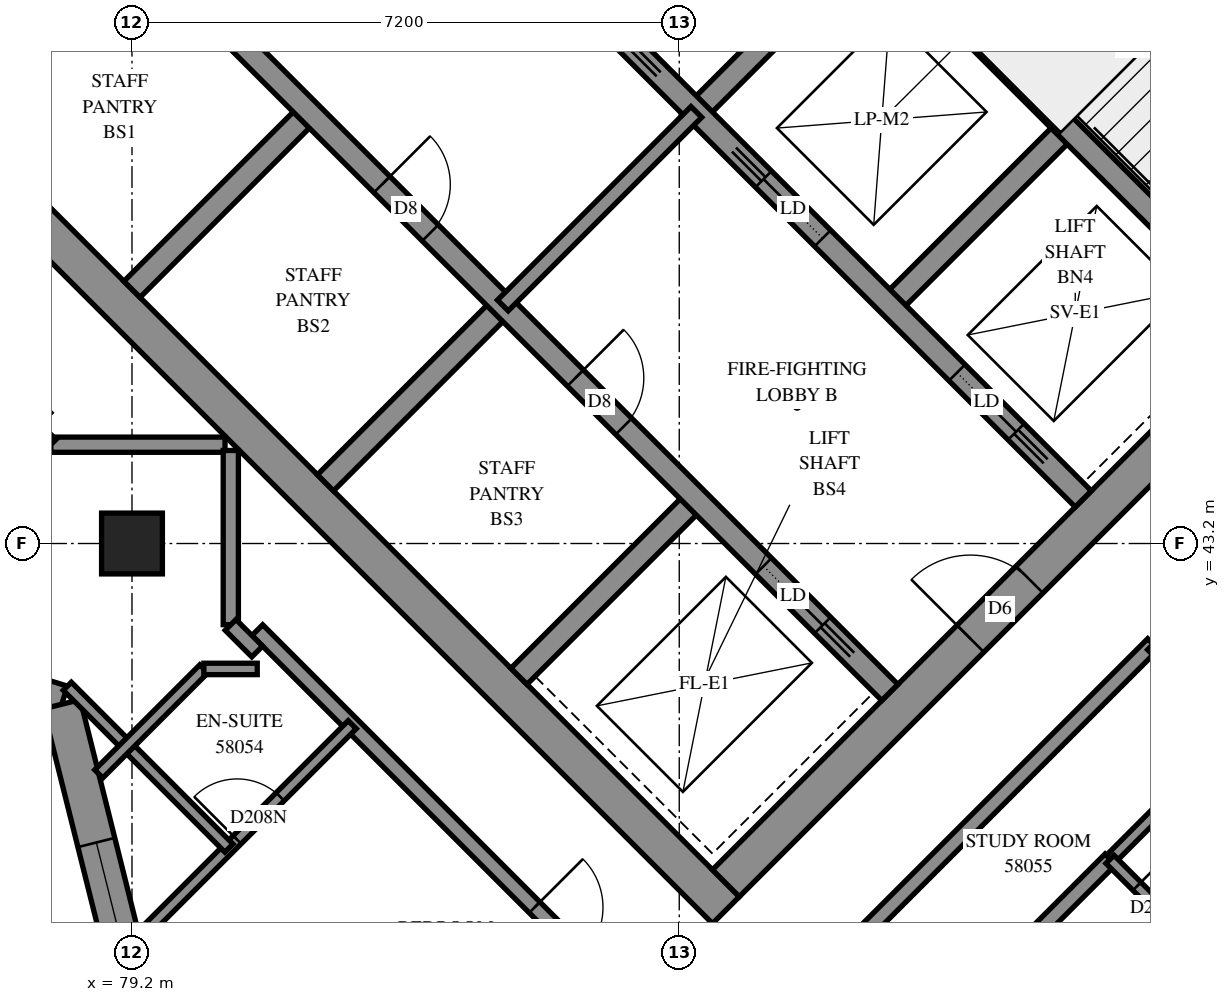
"""IFC4 building model, lengths in metres.
Left out: names, types, materials, properties, quantities, classifications, styles, units other than length and angle.
Written with IfcOpenShell. Run it as: python <this file> out.ifc"""

import sys

from ifc_helpers import new_model, si_unit, direction, frame, frame_2d, origin, origin_2d, place, context, subcontext, project, spatial, polyline, rectangle, outline, extrude, element, fill, save


model = new_model("IFC4")
c1 = context("Model", 3, precision=1e-05, world=origin(), true_north=direction((0.0, 1.0)))
c2 = subcontext(c1, "Body", "Model", "MODEL_VIEW")
j1 = project(units=[si_unit("LENGTHUNIT", "METRE"), si_unit("PLANEANGLEUNIT", "RADIAN")], contexts=[c1])
p1 = place(None, origin())
s1 = spatial("IfcSite", under=j1, at=p1, CompositionType="ELEMENT")
p2 = place(p1, origin())
s2 = spatial("IfcBuilding", under=s1, at=p2, CompositionType="ELEMENT")
p3 = place(p2, frame((0.0, 0.0, 213.4)))
s3 = spatial("IfcBuildingStorey", under=s2, at=p3, CompositionType="ELEMENT", Elevation=213.4)
p4 = place(p3, frame((79.2, 43.2, 0.0), z_axis=(0.0, 0.0, 1.0), x_axis=(1.0, 0.0, 0.0)))
e1 = element("IfcColumn", 1, at=p4, inside=s3, PredefinedType="COLUMN", context=c2, shape_type="SweptSolid", body=[
    extrude(rectangle(XDim=0.8, YDim=0.8, at=origin_2d()), origin(), (0.0, 0.0, 1.0), 3.1),
])
p5 = place(p3, frame((76.124, 49.267, -0.3), z_axis=(0.0, 0.0, 1.0), x_axis=(0.7071067812, -0.7071067812, 0.0)))
e2 = element("IfcWall", 2, at=p5, inside=s3, PredefinedType="SHEAR", context=c2, shape_type="SweptSolid", body=[
    extrude(rectangle(XDim=15.4, YDim=0.5, at=frame_2d((7.7, 0.0))), origin(), (0.0, 0.0, 1.0), 2.7),
])
p6 = place(p3, frame((86.66, 59.802, -0.3), z_axis=(0.0, 0.0, 1.0), x_axis=(0.7071067812, -0.7071067812, 0.0)))
e3 = element("IfcWall", 3, at=p6, inside=s3, PredefinedType="SHEAR", context=c2, shape_type="SweptSolid", body=[
    extrude(rectangle(XDim=15.4, YDim=0.5, at=frame_2d((7.7, 0.0))), origin(), (0.0, 0.0, 1.0), 2.7),
])
p7 = place(p6, frame((10.5, 0.0, 0.3)))
e4 = element("IfcOpeningElement", 4, at=p7, cuts=e3, PredefinedType="OPENING", context=c2, shape_type="SweptSolid", body=[
    extrude(rectangle(XDim=0.8, YDim=2.1, at=frame_2d((0.4, 1.05))), frame((0.0, 0.26, 0.0), z_axis=(0.0, -1.0, 0.0), x_axis=(1.0, 0.0, 0.0)), (0.0, 0.0, 1.0), 0.52),
])
p8 = place(p3, frame((76.478, 49.267, -0.3), z_axis=(0.0, 0.0, 1.0), x_axis=(0.7071067812, 0.7071067812, 0.0)))
e5 = element("IfcWall", 5, at=p8, inside=s3, PredefinedType="SHEAR", context=c2, shape_type="SweptSolid", body=[
    extrude(rectangle(XDim=14.4, YDim=0.5, at=frame_2d((7.2, 0.0))), origin(), (0.0, 0.0, 1.0), 2.7),
])
p9 = place(p8, frame((4.55, 0.0, 0.3)))
e6 = element("IfcOpeningElement", 6, at=p9, cuts=e5, PredefinedType="OPENING", context=c2, shape_type="SweptSolid", body=[
    extrude(rectangle(XDim=1.1, YDim=2.1, at=frame_2d((0.55, 1.05))), frame((0.0, 0.26, 0.0), z_axis=(0.0, -1.0, 0.0), x_axis=(1.0, 0.0, 0.0)), (0.0, 0.0, 1.0), 0.52),
])
p10 = place(p8, frame((11.35, 0.0, 0.3)))
e7 = element("IfcOpeningElement", 7, at=p10, cuts=e5, PredefinedType="OPENING", context=c2, shape_type="SweptSolid", body=[
    extrude(rectangle(XDim=1.1, YDim=2.1, at=frame_2d((0.55, 1.05))), frame((0.0, 0.26, 0.0), z_axis=(0.0, -1.0, 0.0), x_axis=(1.0, 0.0, 0.0)), (0.0, 0.0, 1.0), 0.52),
])
p11 = place(p3, frame((87.013, 38.731, -0.3), z_axis=(0.0, 0.0, 1.0), x_axis=(0.7071067812, 0.7071067812, 0.0)))
e8 = element("IfcWall", 8, at=p11, inside=s3, PredefinedType="SHEAR", context=c2, shape_type="SweptSolid", body=[
    extrude(rectangle(XDim=14.4, YDim=0.5, at=frame_2d((7.2, 0.0))), origin(), (0.0, 0.0, 1.0), 2.7),
])
p12 = place(p11, frame((4.55, 0.0, 0.3)))
e9 = element("IfcOpeningElement", 9, at=p12, cuts=e8, PredefinedType="OPENING", context=c2, shape_type="SweptSolid", body=[
    extrude(rectangle(XDim=1.1, YDim=2.1, at=frame_2d((0.55, 1.05))), frame((0.0, 0.26, 0.0), z_axis=(0.0, -1.0, 0.0), x_axis=(1.0, 0.0, 0.0)), (0.0, 0.0, 1.0), 0.52),
])
p13 = place(p11, frame((11.35, 0.0, 0.3)))
e10 = element("IfcOpeningElement", 10, at=p13, cuts=e8, PredefinedType="OPENING", context=c2, shape_type="SweptSolid", body=[
    extrude(rectangle(XDim=1.1, YDim=2.1, at=frame_2d((0.55, 1.05))), frame((0.0, 0.26, 0.0), z_axis=(0.0, -1.0, 0.0), x_axis=(1.0, 0.0, 0.0)), (0.0, 0.0, 1.0), 0.52),
])
p14 = place(p3, frame((79.2, 46.544, 0.0), z_axis=(0.0, 0.0, 1.0), x_axis=(0.7071219326, 0.7070916295, 0.0)))
e11 = element("IfcWall", 11, at=p14, inside=s3, PredefinedType="SOLIDWALL", context=c2, shape_type="SweptSolid", body=[
    extrude(rectangle(XDim=3.3, YDim=0.3, at=frame_2d((1.65, 0.0))), origin(), (0.0, 0.0, 1.0), 3.1),
])
p15 = place(p3, frame((81.746, 43.999, 0.0), z_axis=(0.0, 0.0, 1.0), x_axis=(0.7071067812, 0.7071067812, 0.0)))
e12 = element("IfcWall", 12, at=p15, inside=s3, PredefinedType="SOLIDWALL", context=c2, shape_type="SweptSolid", body=[
    extrude(rectangle(XDim=3.3, YDim=0.3, at=frame_2d((1.65, 0.0))), origin(), (0.0, 0.0, 1.0), 3.1),
])
p16 = place(p3, frame((86.625, 48.878, 0.0), z_axis=(0.0, 0.0, 1.0), x_axis=(0.7071067812, 0.7071067812, 0.0)))
e13 = element("IfcWall", 13, at=p16, inside=s3, PredefinedType="SOLIDWALL", context=c2, shape_type="SweptSolid", body=[
    extrude(rectangle(XDim=3.3, YDim=0.3, at=frame_2d((1.65, 0.0))), origin(), (0.0, 0.0, 1.0), 3.1),
])
p17 = place(p3, frame((84.291, 41.453, 0.0), z_axis=(0.0, 0.0, 1.0), x_axis=(0.7071067812, 0.7071067812, 0.0)))
e14 = element("IfcWall", 14, at=p17, inside=s3, PredefinedType="SOLIDWALL", context=c2, shape_type="SweptSolid", body=[
    extrude(rectangle(XDim=3.3, YDim=0.3, at=frame_2d((1.65, 0.0))), origin(), (0.0, 0.0, 1.0), 3.1),
])
p18 = place(p3, frame((89.17, 46.332, 0.0), z_axis=(0.0, 0.0, 1.0), x_axis=(0.7071067812, 0.7071067812, 0.0)))
e15 = element("IfcWall", 15, at=p18, inside=s3, PredefinedType="SOLIDWALL", context=c2, shape_type="SweptSolid", body=[
    extrude(rectangle(XDim=3.3, YDim=0.3, at=frame_2d((1.65, 0.0))), origin(), (0.0, 0.0, 1.0), 3.1),
])
p19 = place(p3, frame((78.988, 51.423, 0.0), z_axis=(0.0, 0.0, 1.0), x_axis=(0.7071067812, -0.7071067812, 0.0)))
e16 = element("IfcWall", 16, at=p19, inside=s3, PredefinedType="SOLIDWALL", context=c2, shape_type="SweptSolid", body=[
    extrude(rectangle(XDim=14.4, YDim=0.3, at=frame_2d((7.2, 0.0))), origin(), (0.0, 0.0, 1.0), 3.1),
])
p20 = place(p19, frame((1.35, 0.0, 0.0)))
e17 = element("IfcOpeningElement", 17, at=p20, cuts=e16, PredefinedType="OPENING", context=c2, shape_type="SweptSolid", body=[
    extrude(rectangle(XDim=0.9, YDim=2.1, at=frame_2d((0.45, 1.05))), frame((0.0, 0.16, 0.0), z_axis=(0.0, -1.0, 0.0), x_axis=(1.0, 0.0, 0.0)), (0.0, 0.0, 1.0), 0.32),
])
p21 = place(p19, frame((4.95, 0.0, 0.0)))
e18 = element("IfcOpeningElement", 18, at=p21, cuts=e16, PredefinedType="OPENING", context=c2, shape_type="SweptSolid", body=[
    extrude(rectangle(XDim=0.9, YDim=2.1, at=frame_2d((0.45, 1.05))), frame((0.0, 0.16, 0.0), z_axis=(0.0, -1.0, 0.0), x_axis=(1.0, 0.0, 0.0)), (0.0, 0.0, 1.0), 0.32),
])
p22 = place(p19, frame((8.55, 0.0, 0.0)))
e19 = element("IfcOpeningElement", 19, at=p22, cuts=e16, PredefinedType="OPENING", context=c2, shape_type="SweptSolid", body=[
    extrude(rectangle(XDim=0.9, YDim=2.1, at=frame_2d((0.45, 1.05))), frame((0.0, 0.16, 0.0), z_axis=(0.0, -1.0, 0.0), x_axis=(1.0, 0.0, 0.0)), (0.0, 0.0, 1.0), 0.32),
])
p23 = place(p19, frame((12.05, 0.0, 0.0)))
e20 = element("IfcOpeningElement", 20, at=p23, cuts=e16, PredefinedType="OPENING", context=c2, shape_type="SweptSolid", body=[
    extrude(rectangle(XDim=1.1, YDim=2.1, at=frame_2d((0.55, 1.05))), frame((0.0, 0.16, 0.0), z_axis=(0.0, -1.0, 0.0), x_axis=(1.0, 0.0, 0.0)), (0.0, 0.0, 1.0), 0.32),
])
p24 = place(p3, frame((81.534, 53.969, 0.0), z_axis=(0.0, 0.0, 1.0), x_axis=(0.707103309, -0.7071102534, 0.0)))
e21 = element("IfcWall", 21, at=p24, inside=s3, PredefinedType="SOLIDWALL", context=c2, shape_type="SweptSolid", body=[
    extrude(rectangle(XDim=14.4, YDim=0.3, at=frame_2d((7.2, 0.0))), origin(), (0.0, 0.0, 1.0), 3.1),
])
p25 = place(p24, frame((1.25, 0.0, 0.0)))
e22 = element("IfcOpeningElement", 22, at=p25, cuts=e21, PredefinedType="OPENING", context=c2, shape_type="SweptSolid", body=[
    extrude(rectangle(XDim=1.1, YDim=2.1, at=frame_2d((0.55, 1.05))), frame((0.0, 0.16, 0.0), z_axis=(0.0, -1.0, 0.0), x_axis=(1.0, 0.0, 0.0)), (0.0, 0.0, 1.0), 0.32),
])
p26 = place(p24, frame((4.85, 0.0, 0.0)))
e23 = element("IfcOpeningElement", 23, at=p26, cuts=e21, PredefinedType="OPENING", context=c2, shape_type="SweptSolid", body=[
    extrude(rectangle(XDim=1.1, YDim=2.1, at=frame_2d((0.55, 1.05))), frame((0.0, 0.16, 0.0), z_axis=(0.0, -1.0, 0.0), x_axis=(1.0, 0.0, 0.0)), (0.0, 0.0, 1.0), 0.32),
])
p27 = place(p24, frame((8.45, 0.0, 0.0)))
e24 = element("IfcOpeningElement", 24, at=p27, cuts=e21, PredefinedType="OPENING", context=c2, shape_type="SweptSolid", body=[
    extrude(rectangle(XDim=1.1, YDim=2.1, at=frame_2d((0.55, 1.05))), frame((0.0, 0.16, 0.0), z_axis=(0.0, -1.0, 0.0), x_axis=(1.0, 0.0, 0.0)), (0.0, 0.0, 1.0), 0.32),
])
p28 = place(p24, frame((12.05, 0.0, 0.0)))
e25 = element("IfcOpeningElement", 25, at=p28, cuts=e21, PredefinedType="OPENING", context=c2, shape_type="SweptSolid", body=[
    extrude(rectangle(XDim=1.1, YDim=2.1, at=frame_2d((0.55, 1.05))), frame((0.0, 0.16, 0.0), z_axis=(0.0, -1.0, 0.0), x_axis=(1.0, 0.0, 0.0)), (0.0, 0.0, 1.0), 0.32),
])
p29 = place(p3, frame((88.958, 51.211, 0.0), z_axis=(0.0, 0.0, 1.0), x_axis=(0.7070998367, -0.7071137256, 0.0)))
e26 = element("IfcWall", 26, at=p29, inside=s3, PredefinedType="SOLIDWALL", context=c2, shape_type="SweptSolid", body=[
    extrude(rectangle(XDim=7.2, YDim=0.3, at=frame_2d((3.6, 0.0))), origin(), (0.0, 0.0, 1.0), 3.1),
])
p30 = place(p3, frame((74.48, 42.255, 0.0), z_axis=(0.0, 0.0, 1.0), x_axis=(0.9556504763, -0.2945032548, 0.0)))
e27 = element("IfcWall", 27, at=p30, inside=s3, PredefinedType="SOLIDWALL", context=c2, shape_type="SweptSolid", body=[
    extrude(outline(polyline([(0.056, -0.25), (3.832, -0.25), (4.114, 0.25), (-0.056, 0.25), (0.056, -0.25)])), origin(), (0.0, 0.0, 1.0), 3.1),
])
p31 = place(p30, frame((1.823, 0.0, 0.45)))
e28 = element("IfcOpeningElement", 28, at=p31, cuts=e27, PredefinedType="OPENING", context=c2, shape_type="SweptSolid", body=[
    extrude(rectangle(XDim=1.2, YDim=2.5, at=frame_2d((0.6, 1.25))), frame((0.0, 0.26, 0.0), z_axis=(0.0, -1.0, 0.0), x_axis=(1.0, 0.0, 0.0)), (0.0, 0.0, 1.0), 0.52),
])
p32 = place(p3, frame((78.276, 41.085, 0.0), z_axis=(0.0, 0.0, 1.0), x_axis=(0.2425659058, -0.9701349295, 0.0)))
e29 = element("IfcWall", 29, at=p32, inside=s3, PredefinedType="SOLIDWALL", context=c2, shape_type="SweptSolid", body=[
    extrude(outline(polyline([(0.141, -0.25), (4.806, -0.25), (4.519, 0.25), (-0.141, 0.25), (0.141, -0.25)])), origin(), (0.0, 0.0, 1.0), 3.1),
])
p33 = place(p32, frame((1.875, 0.0, 0.45)))
e30 = element("IfcOpeningElement", 30, at=p33, cuts=e29, PredefinedType="OPENING", context=c2, shape_type="SweptSolid", body=[
    extrude(rectangle(XDim=1.2, YDim=2.5, at=frame_2d((0.6, 1.25))), frame((0.0, 0.26, 0.0), z_axis=(0.0, -1.0, 0.0), x_axis=(1.0, 0.0, 0.0)), (0.0, 0.0, 1.0), 0.52),
])
p34 = place(p3, frame((91.313, 53.354, 0.0), z_axis=(0.0, 0.0, 1.0), x_axis=(0.7071140275, -0.7070995348, 0.0)))
e31 = element("IfcWall", 31, at=p34, inside=s3, PredefinedType="PARTITIONING", context=c2, shape_type="SweptSolid", body=[
    extrude(rectangle(XDim=6.9, YDim=0.15, at=frame_2d((3.45, 0.0))), origin(), (0.0, 0.0, 1.0), 3.1),
])
p35 = place(p3, frame((84.079, 46.332, 0.0), z_axis=(0.0, 0.0, 1.0), x_axis=(0.7071067812, 0.7071067812, 0.0)))
e32 = element("IfcWall", 32, at=p35, inside=s3, PredefinedType="PARTITIONING", context=c2, shape_type="SweptSolid", body=[
    extrude(rectangle(XDim=3.6, YDim=0.2, at=frame_2d((1.8, 0.0))), origin(), (0.0, 0.0, 1.0), 3.1),
])
p36 = place(p3, frame((85.007, 31.981, 0.0), z_axis=(0.0, 0.0, 1.0), x_axis=(0.7072318784, 0.7069816619, 0.0)))
e33 = element("IfcWall", 33, at=p36, inside=s3, PredefinedType="PARTITIONING", context=c2, shape_type="SweptSolid", body=[
    extrude(rectangle(XDim=9.991, YDim=0.2, at=frame_2d((4.996, 0.0))), origin(), (0.0, 0.0, 1.0), 3.1),
])
p37 = place(p3, frame((86.835, 36.079, 0.0), z_axis=(0.0, 0.0, 1.0), x_axis=(0.7071067812, 0.7071067812, 0.0)))
e34 = element("IfcWall", 34, at=p37, inside=s3, PredefinedType="PARTITIONING", context=c2, shape_type="SweptSolid", body=[
    extrude(rectangle(XDim=8.2, YDim=0.2, at=frame_2d((4.1, 0.0))), origin(), (0.0, 0.0, 1.0), 3.1),
])
p38 = place(p3, frame((80.849, 42.061, 0.0), z_axis=(0.0, 0.0, 1.0), x_axis=(0.7071067812, -0.7071067812, 0.0)))
e35 = element("IfcWall", 35, at=p38, inside=s3, PredefinedType="PARTITIONING", context=c2, shape_type="SweptSolid", body=[
    extrude(rectangle(XDim=6.964, YDim=0.2, at=frame_2d((3.482, 0.0))), origin(), (0.0, 0.0, 1.0), 3.1),
])
p39 = place(p38, frame((5.159, 0.0, 0.0)))
e36 = element("IfcOpeningElement", 36, at=p39, cuts=e35, PredefinedType="OPENING", context=c2, shape_type="SweptSolid", body=[
    extrude(rectangle(XDim=0.9, YDim=2.1, at=frame_2d((0.45, 1.05))), frame((0.0, 0.11, 0.0), z_axis=(0.0, -1.0, 0.0), x_axis=(1.0, 0.0, 0.0)), (0.0, 0.0, 1.0), 0.22),
])
p40 = place(p3, frame((92.633, 41.873, 0.0), z_axis=(0.0, 0.0, 1.0), x_axis=(0.7071067812, -0.7071067812, 0.0)))
e37 = element("IfcWall", 37, at=p40, inside=s3, PredefinedType="PARTITIONING", context=c2, shape_type="SweptSolid", body=[
    extrude(rectangle(XDim=5.199, YDim=0.2, at=frame_2d((2.599, 0.0))), origin(), (0.0, 0.0, 1.0), 3.1),
])
p41 = place(p40, frame((0.253, 0.0, 0.0)))
e38 = element("IfcOpeningElement", 38, at=p41, cuts=e37, PredefinedType="OPENING", context=c2, shape_type="SweptSolid", body=[
    extrude(rectangle(XDim=1.0, YDim=2.1, at=frame_2d((0.5, 1.05))), frame((0.0, 0.11, 0.0), z_axis=(0.0, -1.0, 0.0), x_axis=(1.0, 0.0, 0.0)), (0.0, 0.0, 1.0), 0.22),
])
p42 = place(p40, frame((3.948, 0.0, 0.0)))
e39 = element("IfcOpeningElement", 39, at=p42, cuts=e37, PredefinedType="OPENING", context=c2, shape_type="SweptSolid", body=[
    extrude(rectangle(XDim=0.9, YDim=2.1, at=frame_2d((0.45, 1.05))), frame((0.0, 0.11, 0.0), z_axis=(0.0, -1.0, 0.0), x_axis=(1.0, 0.0, 0.0)), (0.0, 0.0, 1.0), 0.22),
])
p43 = place(p3, frame((79.3, 38.02, 0.0), z_axis=(0.0, 0.0, 1.0), x_axis=(0.7070941404, 0.7071194217, 0.0)))
e40 = element("IfcWall", 40, at=p43, inside=s3, PredefinedType="PARTITIONING", context=c2, shape_type="SweptSolid", body=[
    extrude(rectangle(XDim=3.955, YDim=0.15, at=frame_2d((1.978, 0.0))), origin(), (0.0, 0.0, 1.0), 3.1),
])
p44 = place(p43, frame((1.815, 0.0, 0.0)))
e41 = element("IfcOpeningElement", 41, at=p44, cuts=e40, PredefinedType="OPENING", context=c2, shape_type="SweptSolid", body=[
    extrude(rectangle(XDim=0.8, YDim=2.1, at=frame_2d((0.4, 1.05))), frame((0.0, 0.085, 0.0), z_axis=(0.0, -1.0, 0.0), x_axis=(1.0, 0.0, 0.0)), (0.0, 0.0, 1.0), 0.17),
])
p45 = place(p3, frame((78.349, 41.322, 0.0), z_axis=(0.0, 0.0, 1.0), x_axis=(0.7065914398, -0.7076217472, 0.0)))
e42 = element("IfcWall", 42, at=p45, inside=s3, PredefinedType="PARTITIONING", context=c2, shape_type="SweptSolid", body=[
    extrude(rectangle(XDim=3.009, YDim=0.15, at=frame_2d((1.504, 0.0))), origin(), (0.0, 0.0, 1.0), 3.1),
])
p46 = place(p3, frame((92.072, 39.046, 0.0), z_axis=(0.0, 0.0, 1.0), x_axis=(0.706689978, 0.7075233388, 0.0)))
e43 = element("IfcWall", 43, at=p46, inside=s3, PredefinedType="PARTITIONING", context=c2, shape_type="SweptSolid", body=[
    extrude(rectangle(XDim=2.4, YDim=0.15, at=frame_2d((1.2, 0.0))), origin(), (0.0, 0.0, 1.0), 3.1),
])
for number, where, z_axis, x_axis in (
    (44, (78.132, 44.5, 0.0), (0.0, 0.0, 1.0), (1.0, 0.0, 0.0)),
    (45, (80.5, 42.132, 0.0), (0.0, 0.0, 1.0), (0.0, 1.0, 0.0)),
):
    element("IfcWall", number, at=place(p3, frame(where, z_axis=z_axis, x_axis=x_axis)), inside=s3, PredefinedType="PARTITIONING", context=c2, shape_type="SweptSolid", body=[
        extrude(rectangle(XDim=2.292, YDim=0.2, at=frame_2d((1.146, 0.0))), origin(), (0.0, 0.0, 1.0), 3.1),
    ])
p47 = place(p3, frame((78.763, 40.169, 0.0), z_axis=(0.0, 0.0, 1.0), x_axis=(0.7070811971, 0.7071323644, 0.0)))
e46 = element("IfcWall", 46, at=p47, inside=s3, PredefinedType="PARTITIONING", context=c2, shape_type="SweptSolid", body=[
    extrude(rectangle(XDim=1.954, YDim=0.15, at=frame_2d((0.977, 0.0))), origin(), (0.0, 0.0, 1.0), 3.1),
])
p48 = place(p3, frame((92.067, 39.045, 0.0), z_axis=(0.0, 0.0, 1.0), x_axis=(0.7071067812, -0.7071067812, 0.0)))
e47 = element("IfcWall", 47, at=p48, inside=s3, PredefinedType="PARTITIONING", context=c2, shape_type="SweptSolid", body=[
    extrude(rectangle(XDim=1.898, YDim=0.15, at=frame_2d((0.949, 0.0))), origin(), (0.0, 0.0, 1.0), 3.1),
])
p49 = place(p48, frame((0.501, 0.0, 0.0)))
e48 = element("IfcOpeningElement", 48, at=p49, cuts=e47, PredefinedType="OPENING", context=c2, shape_type="SweptSolid", body=[
    extrude(rectangle(XDim=0.8, YDim=2.1, at=frame_2d((0.4, 1.05))), frame((0.0, 0.085, 0.0), z_axis=(0.0, -1.0, 0.0), x_axis=(1.0, 0.0, 0.0)), (0.0, 0.0, 1.0), 0.17),
])
p50 = place(p3, frame((80.146, 41.55, 0.0), z_axis=(0.0, 0.0, 1.0), x_axis=(1.0, 0.0, 0.0)))
e49 = element("IfcWall", 49, at=p50, inside=s3, PredefinedType="PARTITIONING", context=c2, shape_type="SweptSolid", body=[
    extrude(rectangle(XDim=0.702, YDim=0.15, at=frame_2d((0.351, 0.0))), origin(), (0.0, 0.0, 1.0), 3.1),
])
for number, where, z_axis, x_axis in (
    (50, (77.779, 44.847, 0.0), (0.0, 0.0, 1.0), (0.707, -0.707, 0.0)),
    (51, (80.497, 42.129, 0.0), (0.0, 0.0, 1.0), (0.707, -0.707, 0.0)),
):
    element("IfcWall", number, at=place(p3, frame(where, z_axis=z_axis, x_axis=x_axis)), inside=s3, PredefinedType="PARTITIONING", context=c2, shape_type="SweptSolid", body=[
        extrude(rectangle(XDim=0.495, YDim=0.2, at=frame_2d((0.247, 0.0))), origin(), (0.0, 0.0, 1.0), 3.1),
    ])
p51 = place(p33, origin())
e52 = element("IfcWindow", 52, at=p51, inside=s3, PartitioningType="SINGLE_PANEL", PredefinedType="WINDOW", context=c2, shape_type="SweptSolid", body=[
    extrude(rectangle(XDim=1.2, YDim=2.5, at=frame_2d((0.6, 1.25))), frame((0.0, 0.18, 0.0), z_axis=(0.0, -1.0, 0.0), x_axis=(1.0, 0.0, 0.0)), (0.0, 0.0, 1.0), 0.06),
])
fill(e30, e52)
p52 = place(p12, origin())
e53 = element("IfcDoor", 53, at=p52, inside=s3, OperationType="DOUBLE_DOOR_SINGLE_SWING", PredefinedType="DOOR", context=c2, shape_type="SweptSolid", body=[
    extrude(rectangle(XDim=1.1, YDim=2.1, at=frame_2d((0.55, 1.05))), frame((0.0, 0.025, 0.0), z_axis=(0.0, -1.0, 0.0), x_axis=(1.0, 0.0, 0.0)), (0.0, 0.0, 1.0), 0.05),
])
fill(e9, e53)
p53 = place(p21, origin())
e54 = element("IfcDoor", 54, at=p53, inside=s3, OperationType="SINGLE_SWING_LEFT", PredefinedType="DOOR", context=c2, shape_type="SweptSolid", body=[
    extrude(rectangle(XDim=0.9, YDim=2.1, at=frame_2d((0.45, 1.05))), frame((0.0, 0.025, 0.0), z_axis=(0.0, -1.0, 0.0), x_axis=(1.0, 0.0, 0.0)), (0.0, 0.0, 1.0), 0.05),
])
fill(e18, e54)
p54 = place(p22, origin())
e55 = element("IfcDoor", 55, at=p54, inside=s3, OperationType="SINGLE_SWING_LEFT", PredefinedType="DOOR", context=c2, shape_type="SweptSolid", body=[
    extrude(rectangle(XDim=0.9, YDim=2.1, at=frame_2d((0.45, 1.05))), frame((0.0, 0.025, 0.0), z_axis=(0.0, -1.0, 0.0), x_axis=(1.0, 0.0, 0.0)), (0.0, 0.0, 1.0), 0.05),
])
fill(e19, e55)
p55 = place(p23, origin())
e56 = element("IfcDoor", 56, at=p55, inside=s3, OperationType="SLIDING_TO_RIGHT", PredefinedType="DOOR", context=c2, shape_type="SweptSolid", body=[
    extrude(rectangle(XDim=1.1, YDim=2.1, at=frame_2d((0.55, 1.05))), frame((0.0, 0.025, 0.0), z_axis=(0.0, -1.0, 0.0), x_axis=(1.0, 0.0, 0.0)), (0.0, 0.0, 1.0), 0.05),
])
fill(e20, e56)
p56 = place(p27, origin())
e57 = element("IfcDoor", 57, at=p56, inside=s3, OperationType="SLIDING_TO_LEFT", PredefinedType="DOOR", context=c2, shape_type="SweptSolid", body=[
    extrude(rectangle(XDim=1.1, YDim=2.1, at=frame_2d((0.55, 1.05))), frame((0.0, 0.025, 0.0), z_axis=(0.0, -1.0, 0.0), x_axis=(1.0, 0.0, 0.0)), (0.0, 0.0, 1.0), 0.05),
])
fill(e24, e57)
p57 = place(p28, origin())
e58 = element("IfcDoor", 58, at=p57, inside=s3, OperationType="SLIDING_TO_RIGHT", PredefinedType="DOOR", context=c2, shape_type="SweptSolid", body=[
    extrude(rectangle(XDim=1.1, YDim=2.1, at=frame_2d((0.55, 1.05))), frame((0.0, 0.025, 0.0), z_axis=(0.0, -1.0, 0.0), x_axis=(1.0, 0.0, 0.0)), (0.0, 0.0, 1.0), 0.05),
])
fill(e25, e58)
p58 = place(p39, origin())
e59 = element("IfcDoor", 59, at=p58, inside=s3, OperationType="SINGLE_SWING_RIGHT", PredefinedType="DOOR", context=c2, shape_type="SweptSolid", body=[
    extrude(rectangle(XDim=0.9, YDim=2.1, at=frame_2d((0.45, 1.05))), frame((0.0, 0.025, 0.0), z_axis=(0.0, -1.0, 0.0), x_axis=(1.0, 0.0, 0.0)), (0.0, 0.0, 1.0), 0.05),
])
fill(e36, e59)
p59 = place(p44, origin())
e60 = element("IfcDoor", 60, at=p59, inside=s3, OperationType="SINGLE_SWING_RIGHT", PredefinedType="DOOR", context=c2, shape_type="SweptSolid", body=[
    extrude(rectangle(XDim=0.8, YDim=2.1, at=frame_2d((0.4, 1.05))), frame((0.0, 0.025, 0.0), z_axis=(0.0, -1.0, 0.0), x_axis=(1.0, 0.0, 0.0)), (0.0, 0.0, 1.0), 0.05),
])
fill(e41, e60)
p60 = place(p49, origin())
e61 = element("IfcDoor", 61, at=p60, inside=s3, OperationType="SINGLE_SWING_RIGHT", PredefinedType="DOOR", context=c2, shape_type="SweptSolid", body=[
    extrude(rectangle(XDim=0.8, YDim=2.1, at=frame_2d((0.4, 1.05))), frame((0.0, 0.025, 0.0), z_axis=(0.0, -1.0, 0.0), x_axis=(1.0, 0.0, 0.0)), (0.0, 0.0, 1.0), 0.05),
])
fill(e48, e61)
save(model, sys.argv[1])
